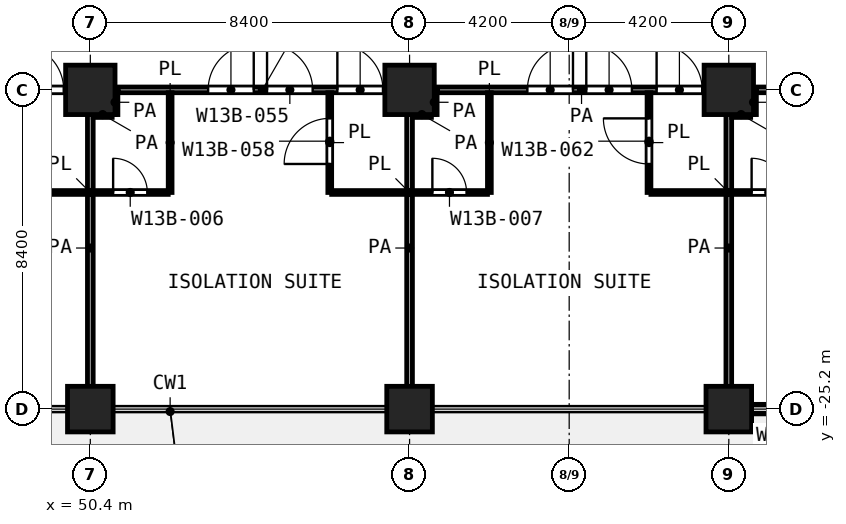
"""IFC4 building model, lengths in metres.
Left out: names, types, materials, properties, quantities, classifications, styles, units other than length and angle.
Written with IfcOpenShell. Run it as: python <this file> out.ifc"""

import sys

from ifc_helpers import new_model, si_unit, direction, frame, frame_2d, origin, origin_2d, place, context, subcontext, project, spatial, rectangle, extrude, element, fill, save


model = new_model("IFC4")
c1 = context("Model", 3, precision=1e-05, world=origin(), true_north=direction((0.0, 1.0)))
c2 = subcontext(c1, "Body", "Model", "MODEL_VIEW")
j1 = project(units=[si_unit("LENGTHUNIT", "METRE"), si_unit("PLANEANGLEUNIT", "RADIAN")], contexts=[c1])
p1 = place(None, origin())
s1 = spatial("IfcSite", under=j1, at=p1, CompositionType="ELEMENT")
p2 = place(p1, origin())
s2 = spatial("IfcBuilding", under=s1, at=p2, CompositionType="ELEMENT")
p3 = place(p2, frame((0.0, 0.0, 89.6)))
s3 = spatial("IfcBuildingStorey", under=s2, at=p3, CompositionType="ELEMENT", Elevation=89.6)
for number, where, z_axis, x_axis in (
    (1, (50.4, -16.8, 0.0), (0.0, 0.0, 1.0), (1.0, 0.0, 0.0)),
    (2, (58.8, -16.8, 0.0), (0.0, 0.0, 1.0), (1.0, 0.0, 0.0)),
    (3, (67.2, -16.8, 0.0), (0.0, 0.0, 1.0), (1.0, 0.0, 0.0)),
):
    element("IfcColumn", number, at=place(p3, frame(where, z_axis=z_axis, x_axis=x_axis)), inside=s3, PredefinedType="COLUMN", context=c2, shape_type="SweptSolid", body=[
        extrude(rectangle(XDim=1.3, YDim=1.3, at=origin_2d()), origin(), (0.0, 0.0, 1.0), 4.2),
    ])
for number, where, z_axis, x_axis in (
    (4, (50.4, -25.2, 0.0), (0.0, 0.0, 1.0), (1.0, 0.0, 0.0)),
    (5, (58.8, -25.2, 0.0), (0.0, 0.0, 1.0), (1.0, 0.0, 0.0)),
    (6, (67.2, -25.2, 0.0), (0.0, 0.0, 1.0), (1.0, 0.0, 0.0)),
):
    element("IfcColumn", number, at=place(p3, frame(where, z_axis=z_axis, x_axis=x_axis)), inside=s3, PredefinedType="COLUMN", context=c2, shape_type="SweptSolid", body=[
        extrude(rectangle(XDim=1.2, YDim=1.2, at=origin_2d()), origin(), (0.0, 0.0, 1.0), 4.2),
    ])
p4 = place(p3, frame((67.8, -25.2, 0.0), z_axis=(0.0, 0.0, 1.0), x_axis=(1.0, 0.0, 0.0)))
e7 = element("IfcWall", 7, at=p4, inside=s3, PredefinedType="SOLIDWALL", context=c2, shape_type="SweptSolid", body=[
    extrude(rectangle(XDim=2.688, YDim=0.25, at=frame_2d((1.344, 0.0))), origin(), (0.0, 0.0, 1.0), 3.58),
])
p5 = place(p4, frame((0.444, 0.0, 0.0)))
e8 = element("IfcOpeningElement", 8, at=p5, cuts=e7, PredefinedType="OPENING", context=c2, shape_type="SweptSolid", body=[
    extrude(rectangle(XDim=1.8, YDim=2.1, at=frame_2d((0.9, 1.05))), frame((0.0, 0.135, 0.0), z_axis=(0.0, -1.0, 0.0), x_axis=(1.0, 0.0, 0.0)), (0.0, 0.0, 1.0), 0.27),
])
p6 = place(p3, frame((48.35, -19.5, 0.0), z_axis=(0.0, 0.0, 1.0), x_axis=(1.0, 0.0, 0.0)))
e9 = element("IfcWall", 9, at=p6, inside=s3, PredefinedType="PARTITIONING", context=c2, shape_type="SweptSolid", body=[
    extrude(rectangle(XDim=4.1, YDim=0.1, at=frame_2d((2.05, 0.0))), origin(), (0.0, 0.0, 1.0), 3.7),
])
p7 = place(p6, frame((2.65, 0.0, 0.0)))
e10 = element("IfcOpeningElement", 10, at=p7, cuts=e9, PredefinedType="OPENING", context=c2, shape_type="SweptSolid", body=[
    extrude(rectangle(XDim=0.9, YDim=2.1, at=frame_2d((0.45, 1.05))), frame((0.0, 0.06, 0.0), z_axis=(0.0, -1.0, 0.0), x_axis=(1.0, 0.0, 0.0)), (0.0, 0.0, 1.0), 0.12),
])
p8 = place(p3, frame((56.75, -19.5, 0.0), z_axis=(0.0, 0.0, 1.0), x_axis=(1.0, 0.0, 0.0)))
e11 = element("IfcWall", 11, at=p8, inside=s3, PredefinedType="PARTITIONING", context=c2, shape_type="SweptSolid", body=[
    extrude(rectangle(XDim=4.1, YDim=0.1, at=frame_2d((2.05, 0.0))), origin(), (0.0, 0.0, 1.0), 3.7),
])
p9 = place(p8, frame((2.65, 0.0, 0.0)))
e12 = element("IfcOpeningElement", 12, at=p9, cuts=e11, PredefinedType="OPENING", context=c2, shape_type="SweptSolid", body=[
    extrude(rectangle(XDim=0.9, YDim=2.1, at=frame_2d((0.45, 1.05))), frame((0.0, 0.06, 0.0), z_axis=(0.0, -1.0, 0.0), x_axis=(1.0, 0.0, 0.0)), (0.0, 0.0, 1.0), 0.12),
])
p10 = place(p3, frame((65.15, -19.5, 0.0), z_axis=(0.0, 0.0, 1.0), x_axis=(1.0, 0.0, 0.0)))
e13 = element("IfcWall", 13, at=p10, inside=s3, PredefinedType="PARTITIONING", context=c2, shape_type="SweptSolid", body=[
    extrude(rectangle(XDim=4.1, YDim=0.1, at=frame_2d((2.05, 0.0))), origin(), (0.0, 0.0, 1.0), 3.7),
])
p11 = place(p10, frame((2.65, 0.0, 0.0)))
e14 = element("IfcOpeningElement", 14, at=p11, cuts=e13, PredefinedType="OPENING", context=c2, shape_type="SweptSolid", body=[
    extrude(rectangle(XDim=0.9, YDim=2.1, at=frame_2d((0.45, 1.05))), frame((0.0, 0.06, 0.0), z_axis=(0.0, -1.0, 0.0), x_axis=(1.0, 0.0, 0.0)), (0.0, 0.0, 1.0), 0.12),
])
p12 = place(p3, frame((52.5, -19.5, 0.0), z_axis=(0.0, 0.0, 1.0), x_axis=(0.0, 1.0, 0.0)))
e15 = element("IfcWall", 15, at=p12, inside=s3, PredefinedType="PARTITIONING", context=c2, shape_type="SweptSolid", body=[
    extrude(rectangle(XDim=2.625, YDim=0.1, at=frame_2d((1.312, 0.0))), origin(), (0.0, 0.0, 1.0), 3.7),
])
p13 = place(p3, frame((56.7, -19.5, 0.0), z_axis=(0.0, 0.0, 1.0), x_axis=(0.0, 1.0, 0.0)))
e16 = element("IfcWall", 16, at=p13, inside=s3, PredefinedType="PARTITIONING", context=c2, shape_type="SweptSolid", body=[
    extrude(rectangle(XDim=2.625, YDim=0.1, at=frame_2d((1.312, 0.0))), origin(), (0.0, 0.0, 1.0), 3.7),
])
p14 = place(p13, frame((0.75, 0.0, 0.0)))
e17 = element("IfcOpeningElement", 17, at=p14, cuts=e16, PredefinedType="OPENING", context=c2, shape_type="SweptSolid", body=[
    extrude(rectangle(XDim=1.2, YDim=2.1, at=frame_2d((0.6, 1.05))), frame((0.0, 0.06, 0.0), z_axis=(0.0, -1.0, 0.0), x_axis=(1.0, 0.0, 0.0)), (0.0, 0.0, 1.0), 0.12),
])
p15 = place(p3, frame((60.9, -19.5, 0.0), z_axis=(0.0, 0.0, 1.0), x_axis=(0.0, 1.0, 0.0)))
e18 = element("IfcWall", 18, at=p15, inside=s3, PredefinedType="PARTITIONING", context=c2, shape_type="SweptSolid", body=[
    extrude(rectangle(XDim=2.625, YDim=0.1, at=frame_2d((1.312, 0.0))), origin(), (0.0, 0.0, 1.0), 3.7),
])
p16 = place(p3, frame((65.1, -19.5, 0.0), z_axis=(0.0, 0.0, 1.0), x_axis=(0.0, 1.0, 0.0)))
e19 = element("IfcWall", 19, at=p16, inside=s3, PredefinedType="PARTITIONING", context=c2, shape_type="SweptSolid", body=[
    extrude(rectangle(XDim=2.625, YDim=0.1, at=frame_2d((1.312, 0.0))), origin(), (0.0, 0.0, 1.0), 3.7),
])
p17 = place(p16, frame((0.75, 0.0, 0.0)))
e20 = element("IfcOpeningElement", 20, at=p17, cuts=e19, PredefinedType="OPENING", context=c2, shape_type="SweptSolid", body=[
    extrude(rectangle(XDim=1.2, YDim=2.1, at=frame_2d((0.6, 1.05))), frame((0.0, 0.06, 0.0), z_axis=(0.0, -1.0, 0.0), x_axis=(1.0, 0.0, 0.0)), (0.0, 0.0, 1.0), 0.12),
])
for number, where, z_axis, x_axis in (
    (21, (50.475, -17.45, 0.0), (0.0, 0.0, 1.0), (1.0, 0.0, 0.0)),
    (22, (58.875, -17.45, 0.0), (0.0, 0.0, 1.0), (1.0, 0.0, 0.0)),
    (23, (67.275, -17.45, 0.0), (0.0, 0.0, 1.0), (1.0, 0.0, 0.0)),
):
    element("IfcWall", number, at=place(p3, frame(where, z_axis=z_axis, x_axis=x_axis)), inside=s3, PredefinedType="PARTITIONING", context=c2, shape_type="SweptSolid", body=[
        extrude(rectangle(XDim=0.5, YDim=0.15, at=frame_2d((0.25, 0.0))), origin(), (0.0, 0.0, 1.0), 3.7),
    ])
p18 = place(p3, frame((42.727, -16.8, 0.0), z_axis=(0.0, 0.0, 1.0), x_axis=(1.0, 0.0, 0.0)))
e24 = element("IfcWall", 24, at=p18, inside=s3, PredefinedType="PARTITIONING", context=c2, shape_type="SweptSolid", body=[
    extrude(rectangle(XDim=7.595, YDim=0.15, at=frame_2d((3.797, 0.0))), origin(), (0.0, 0.0, 1.0), 3.7),
])
p19 = place(p18, frame((3.923, 0.0, 0.0)))
e25 = element("IfcOpeningElement", 25, at=p19, cuts=e24, PredefinedType="OPENING", context=c2, shape_type="SweptSolid", body=[
    extrude(rectangle(XDim=1.2, YDim=2.1, at=frame_2d((0.6, 1.05))), frame((0.0, 0.085, 0.0), z_axis=(0.0, -1.0, 0.0), x_axis=(1.0, 0.0, 0.0)), (0.0, 0.0, 1.0), 0.17),
])
p20 = place(p18, frame((2.373, 0.0, 0.0)))
e26 = element("IfcOpeningElement", 26, at=p20, cuts=e24, PredefinedType="OPENING", context=c2, shape_type="SweptSolid", body=[
    extrude(rectangle(XDim=1.2, YDim=2.1, at=frame_2d((0.6, 1.05))), frame((0.0, 0.085, 0.0), z_axis=(0.0, -1.0, 0.0), x_axis=(1.0, 0.0, 0.0)), (0.0, 0.0, 1.0), 0.17),
])
p21 = place(p18, frame((5.773, 0.0, 0.0)))
e27 = element("IfcOpeningElement", 27, at=p21, cuts=e24, PredefinedType="OPENING", context=c2, shape_type="SweptSolid", body=[
    extrude(rectangle(XDim=1.2, YDim=2.1, at=frame_2d((0.6, 1.05))), frame((0.0, 0.085, 0.0), z_axis=(0.0, -1.0, 0.0), x_axis=(1.0, 0.0, 0.0)), (0.0, 0.0, 1.0), 0.17),
])
p22 = place(p3, frame((51.128, -16.8, 0.0), z_axis=(0.0, 0.0, 1.0), x_axis=(1.0, 0.0, 0.0)))
e28 = element("IfcWall", 28, at=p22, inside=s3, PredefinedType="PARTITIONING", context=c2, shape_type="SweptSolid", body=[
    extrude(rectangle(XDim=7.594, YDim=0.15, at=frame_2d((3.797, 0.0))), origin(), (0.0, 0.0, 1.0), 3.7),
])
p23 = place(p22, frame((3.922, 0.0, 0.0)))
e29 = element("IfcOpeningElement", 29, at=p23, cuts=e28, PredefinedType="OPENING", context=c2, shape_type="SweptSolid", body=[
    extrude(rectangle(XDim=1.2, YDim=2.1, at=frame_2d((0.6, 1.05))), frame((0.0, 0.085, 0.0), z_axis=(0.0, -1.0, 0.0), x_axis=(1.0, 0.0, 0.0)), (0.0, 0.0, 1.0), 0.17),
])
p24 = place(p22, frame((2.372, 0.0, 0.0)))
e30 = element("IfcOpeningElement", 30, at=p24, cuts=e28, PredefinedType="OPENING", context=c2, shape_type="SweptSolid", body=[
    extrude(rectangle(XDim=1.2, YDim=2.1, at=frame_2d((0.6, 1.05))), frame((0.0, 0.085, 0.0), z_axis=(0.0, -1.0, 0.0), x_axis=(1.0, 0.0, 0.0)), (0.0, 0.0, 1.0), 0.17),
])
p25 = place(p22, frame((5.772, 0.0, 0.0)))
e31 = element("IfcOpeningElement", 31, at=p25, cuts=e28, PredefinedType="OPENING", context=c2, shape_type="SweptSolid", body=[
    extrude(rectangle(XDim=1.2, YDim=2.1, at=frame_2d((0.6, 1.05))), frame((0.0, 0.085, 0.0), z_axis=(0.0, -1.0, 0.0), x_axis=(1.0, 0.0, 0.0)), (0.0, 0.0, 1.0), 0.17),
])
p26 = place(p3, frame((59.528, -16.8, 0.0), z_axis=(0.0, 0.0, 1.0), x_axis=(1.0, 0.0, 0.0)))
e32 = element("IfcWall", 32, at=p26, inside=s3, PredefinedType="PARTITIONING", context=c2, shape_type="SweptSolid", body=[
    extrude(rectangle(XDim=7.594, YDim=0.15, at=frame_2d((3.797, 0.0))), origin(), (0.0, 0.0, 1.0), 3.7),
])
p27 = place(p26, frame((3.922, 0.0, 0.0)))
e33 = element("IfcOpeningElement", 33, at=p27, cuts=e32, PredefinedType="OPENING", context=c2, shape_type="SweptSolid", body=[
    extrude(rectangle(XDim=1.2, YDim=2.1, at=frame_2d((0.6, 1.05))), frame((0.0, 0.085, 0.0), z_axis=(0.0, -1.0, 0.0), x_axis=(1.0, 0.0, 0.0)), (0.0, 0.0, 1.0), 0.17),
])
p28 = place(p26, frame((2.372, 0.0, 0.0)))
e34 = element("IfcOpeningElement", 34, at=p28, cuts=e32, PredefinedType="OPENING", context=c2, shape_type="SweptSolid", body=[
    extrude(rectangle(XDim=1.2, YDim=2.1, at=frame_2d((0.6, 1.05))), frame((0.0, 0.085, 0.0), z_axis=(0.0, -1.0, 0.0), x_axis=(1.0, 0.0, 0.0)), (0.0, 0.0, 1.0), 0.17),
])
p29 = place(p26, frame((5.772, 0.0, 0.0)))
e35 = element("IfcOpeningElement", 35, at=p29, cuts=e32, PredefinedType="OPENING", context=c2, shape_type="SweptSolid", body=[
    extrude(rectangle(XDim=1.2, YDim=2.1, at=frame_2d((0.6, 1.05))), frame((0.0, 0.085, 0.0), z_axis=(0.0, -1.0, 0.0), x_axis=(1.0, 0.0, 0.0)), (0.0, 0.0, 1.0), 0.17),
])
p30 = place(p3, frame((67.928, -16.8, 0.0), z_axis=(0.0, 0.0, 1.0), x_axis=(1.0, 0.0, 0.0)))
e36 = element("IfcWall", 36, at=p30, inside=s3, PredefinedType="PARTITIONING", context=c2, shape_type="SweptSolid", body=[
    extrude(rectangle(XDim=11.792, YDim=0.15, at=frame_2d((5.896, 0.0))), origin(), (0.0, 0.0, 1.0), 3.7),
])
p31 = place(p30, frame((3.922, 0.0, 0.0)))
e37 = element("IfcOpeningElement", 37, at=p31, cuts=e36, PredefinedType="OPENING", context=c2, shape_type="SweptSolid", body=[
    extrude(rectangle(XDim=1.2, YDim=2.1, at=frame_2d((0.6, 1.05))), frame((0.0, 0.085, 0.0), z_axis=(0.0, -1.0, 0.0), x_axis=(1.0, 0.0, 0.0)), (0.0, 0.0, 1.0), 0.17),
])
p32 = place(p30, frame((2.372, 0.0, 0.0)))
e38 = element("IfcOpeningElement", 38, at=p32, cuts=e36, PredefinedType="OPENING", context=c2, shape_type="SweptSolid", body=[
    extrude(rectangle(XDim=1.2, YDim=2.1, at=frame_2d((0.6, 1.05))), frame((0.0, 0.085, 0.0), z_axis=(0.0, -1.0, 0.0), x_axis=(1.0, 0.0, 0.0)), (0.0, 0.0, 1.0), 0.17),
])
p33 = place(p30, frame((5.772, 0.0, 0.0)))
e39 = element("IfcOpeningElement", 39, at=p33, cuts=e36, PredefinedType="OPENING", context=c2, shape_type="SweptSolid", body=[
    extrude(rectangle(XDim=1.2, YDim=2.1, at=frame_2d((0.6, 1.05))), frame((0.0, 0.085, 0.0), z_axis=(0.0, -1.0, 0.0), x_axis=(1.0, 0.0, 0.0)), (0.0, 0.0, 1.0), 0.17),
])
p34 = place(p30, frame((9.272, 0.0, 0.0)))
e40 = element("IfcOpeningElement", 40, at=p34, cuts=e36, PredefinedType="OPENING", context=c2, shape_type="SweptSolid", body=[
    extrude(rectangle(XDim=1.0, YDim=2.1, at=frame_2d((0.5, 1.05))), frame((0.0, 0.085, 0.0), z_axis=(0.0, -1.0, 0.0), x_axis=(1.0, 0.0, 0.0)), (0.0, 0.0, 1.0), 0.17),
])
p35 = place(p3, frame((50.4, -25.12, 0.0), z_axis=(0.0, 0.0, 1.0), x_axis=(0.0, 1.0, 0.0)))
e41 = element("IfcWall", 41, at=p35, inside=s3, PredefinedType="PARTITIONING", context=c2, shape_type="SweptSolid", body=[
    extrude(rectangle(XDim=8.317, YDim=0.15, at=frame_2d((4.159, 0.0))), origin(), (0.0, 0.0, 1.0), 3.7),
])
p36 = place(p3, frame((51.05, -17.45, 0.0), z_axis=(0.0, 0.0, 1.0), x_axis=(0.0, 1.0, 0.0)))
e42 = element("IfcWall", 42, at=p36, inside=s3, PredefinedType="PARTITIONING", context=c2, shape_type="SweptSolid", body=[
    extrude(rectangle(XDim=0.647, YDim=0.15, at=frame_2d((0.323, 0.0))), origin(), (0.0, 0.0, 1.0), 3.7),
])
p37 = place(p3, frame((58.8, -25.12, 0.0), z_axis=(0.0, 0.0, 1.0), x_axis=(0.0, 1.0, 0.0)))
e43 = element("IfcWall", 43, at=p37, inside=s3, PredefinedType="PARTITIONING", context=c2, shape_type="SweptSolid", body=[
    extrude(rectangle(XDim=8.317, YDim=0.15, at=frame_2d((4.159, 0.0))), origin(), (0.0, 0.0, 1.0), 3.7),
])
p38 = place(p3, frame((59.45, -17.45, 0.0), z_axis=(0.0, 0.0, 1.0), x_axis=(0.0, 1.0, 0.0)))
e44 = element("IfcWall", 44, at=p38, inside=s3, PredefinedType="PARTITIONING", context=c2, shape_type="SweptSolid", body=[
    extrude(rectangle(XDim=0.647, YDim=0.15, at=frame_2d((0.323, 0.0))), origin(), (0.0, 0.0, 1.0), 3.7),
])
p39 = place(p3, frame((67.2, -25.12, 0.0), z_axis=(0.0, 0.0, 1.0), x_axis=(0.0, 1.0, 0.0)))
e45 = element("IfcWall", 45, at=p39, inside=s3, PredefinedType="PARTITIONING", context=c2, shape_type="SweptSolid", body=[
    extrude(rectangle(XDim=8.317, YDim=0.15, at=frame_2d((4.159, 0.0))), origin(), (0.0, 0.0, 1.0), 3.7),
])
p40 = place(p3, frame((67.85, -17.45, 0.0), z_axis=(0.0, 0.0, 1.0), x_axis=(0.0, 1.0, 0.0)))
e46 = element("IfcWall", 46, at=p40, inside=s3, PredefinedType="PARTITIONING", context=c2, shape_type="SweptSolid", body=[
    extrude(rectangle(XDim=0.647, YDim=0.15, at=frame_2d((0.323, 0.0))), origin(), (0.0, 0.0, 1.0), 3.7),
])
p41 = place(p21, origin())
e47 = element("IfcDoor", 47, at=p41, inside=s3, OperationType="SINGLE_SWING_LEFT", PredefinedType="DOOR", context=c2, shape_type="SweptSolid", body=[
    extrude(rectangle(XDim=1.2, YDim=2.1, at=frame_2d((0.6, 1.05))), frame((0.0, 0.025, 0.0), z_axis=(0.0, -1.0, 0.0), x_axis=(1.0, 0.0, 0.0)), (0.0, 0.0, 1.0), 0.05),
])
fill(e27, e47)
p42 = place(p23, origin())
e48 = element("IfcDoor", 48, at=p42, inside=s3, OperationType="SINGLE_SWING_LEFT", PredefinedType="DOOR", context=c2, shape_type="SweptSolid", body=[
    extrude(rectangle(XDim=1.2, YDim=2.1, at=frame_2d((0.6, 1.05))), frame((0.0, 0.025, 0.0), z_axis=(0.0, -1.0, 0.0), x_axis=(1.0, 0.0, 0.0)), (0.0, 0.0, 1.0), 0.05),
])
fill(e29, e48)
p43 = place(p24, origin())
e49 = element("IfcDoor", 49, at=p43, inside=s3, OperationType="SINGLE_SWING_RIGHT", PredefinedType="DOOR", context=c2, shape_type="SweptSolid", body=[
    extrude(rectangle(XDim=1.2, YDim=2.1, at=frame_2d((0.6, 1.05))), frame((0.0, 0.025, 0.0), z_axis=(0.0, -1.0, 0.0), x_axis=(1.0, 0.0, 0.0)), (0.0, 0.0, 1.0), 0.05),
])
fill(e30, e49)
p44 = place(p25, origin())
e50 = element("IfcDoor", 50, at=p44, inside=s3, OperationType="SINGLE_SWING_LEFT", PredefinedType="DOOR", context=c2, shape_type="SweptSolid", body=[
    extrude(rectangle(XDim=1.2, YDim=2.1, at=frame_2d((0.6, 1.05))), frame((0.0, 0.025, 0.0), z_axis=(0.0, -1.0, 0.0), x_axis=(1.0, 0.0, 0.0)), (0.0, 0.0, 1.0), 0.05),
])
fill(e31, e50)
p45 = place(p14, origin())
e51 = element("IfcDoor", 51, at=p45, inside=s3, OperationType="SINGLE_SWING_LEFT", PredefinedType="DOOR", context=c2, shape_type="SweptSolid", body=[
    extrude(rectangle(XDim=1.2, YDim=2.1, at=frame_2d((0.6, 1.05))), frame((0.0, 0.025, 0.0), z_axis=(0.0, -1.0, 0.0), x_axis=(1.0, 0.0, 0.0)), (0.0, 0.0, 1.0), 0.05),
])
fill(e17, e51)
p46 = place(p7, origin())
e52 = element("IfcDoor", 52, at=p46, inside=s3, OperationType="SINGLE_SWING_LEFT", PredefinedType="DOOR", context=c2, shape_type="SweptSolid", body=[
    extrude(rectangle(XDim=0.9, YDim=2.1, at=frame_2d((0.45, 1.05))), frame((0.0, 0.025, 0.0), z_axis=(0.0, -1.0, 0.0), x_axis=(1.0, 0.0, 0.0)), (0.0, 0.0, 1.0), 0.05),
])
fill(e10, e52)
p47 = place(p27, origin())
e53 = element("IfcDoor", 53, at=p47, inside=s3, OperationType="SINGLE_SWING_LEFT", PredefinedType="DOOR", context=c2, shape_type="SweptSolid", body=[
    extrude(rectangle(XDim=1.2, YDim=2.1, at=frame_2d((0.6, 1.05))), frame((0.0, 0.025, 0.0), z_axis=(0.0, -1.0, 0.0), x_axis=(1.0, 0.0, 0.0)), (0.0, 0.0, 1.0), 0.05),
])
fill(e33, e53)
p48 = place(p28, origin())
e54 = element("IfcDoor", 54, at=p48, inside=s3, OperationType="SINGLE_SWING_RIGHT", PredefinedType="DOOR", context=c2, shape_type="SweptSolid", body=[
    extrude(rectangle(XDim=1.2, YDim=2.1, at=frame_2d((0.6, 1.05))), frame((0.0, 0.025, 0.0), z_axis=(0.0, -1.0, 0.0), x_axis=(1.0, 0.0, 0.0)), (0.0, 0.0, 1.0), 0.05),
])
fill(e34, e54)
p49 = place(p29, origin())
e55 = element("IfcDoor", 55, at=p49, inside=s3, OperationType="SINGLE_SWING_LEFT", PredefinedType="DOOR", context=c2, shape_type="SweptSolid", body=[
    extrude(rectangle(XDim=1.2, YDim=2.1, at=frame_2d((0.6, 1.05))), frame((0.0, 0.025, 0.0), z_axis=(0.0, -1.0, 0.0), x_axis=(1.0, 0.0, 0.0)), (0.0, 0.0, 1.0), 0.05),
])
fill(e35, e55)
p50 = place(p17, origin())
e56 = element("IfcDoor", 56, at=p50, inside=s3, OperationType="SINGLE_SWING_RIGHT", PredefinedType="DOOR", context=c2, shape_type="SweptSolid", body=[
    extrude(rectangle(XDim=1.2, YDim=2.1, at=frame_2d((0.6, 1.05))), frame((0.0, 0.025, 0.0), z_axis=(0.0, -1.0, 0.0), x_axis=(1.0, 0.0, 0.0)), (0.0, 0.0, 1.0), 0.05),
])
fill(e20, e56)
p51 = place(p9, origin())
e57 = element("IfcDoor", 57, at=p51, inside=s3, OperationType="SINGLE_SWING_LEFT", PredefinedType="DOOR", context=c2, shape_type="SweptSolid", body=[
    extrude(rectangle(XDim=0.9, YDim=2.1, at=frame_2d((0.45, 1.05))), frame((0.0, 0.025, 0.0), z_axis=(0.0, -1.0, 0.0), x_axis=(1.0, 0.0, 0.0)), (0.0, 0.0, 1.0), 0.05),
])
fill(e12, e57)
p52 = place(p11, origin())
e58 = element("IfcDoor", 58, at=p52, inside=s3, OperationType="SINGLE_SWING_LEFT", PredefinedType="DOOR", context=c2, shape_type="SweptSolid", body=[
    extrude(rectangle(XDim=0.9, YDim=2.1, at=frame_2d((0.45, 1.05))), frame((0.0, 0.025, 0.0), z_axis=(0.0, -1.0, 0.0), x_axis=(1.0, 0.0, 0.0)), (0.0, 0.0, 1.0), 0.05),
])
fill(e14, e58)
save(model, sys.argv[1])
